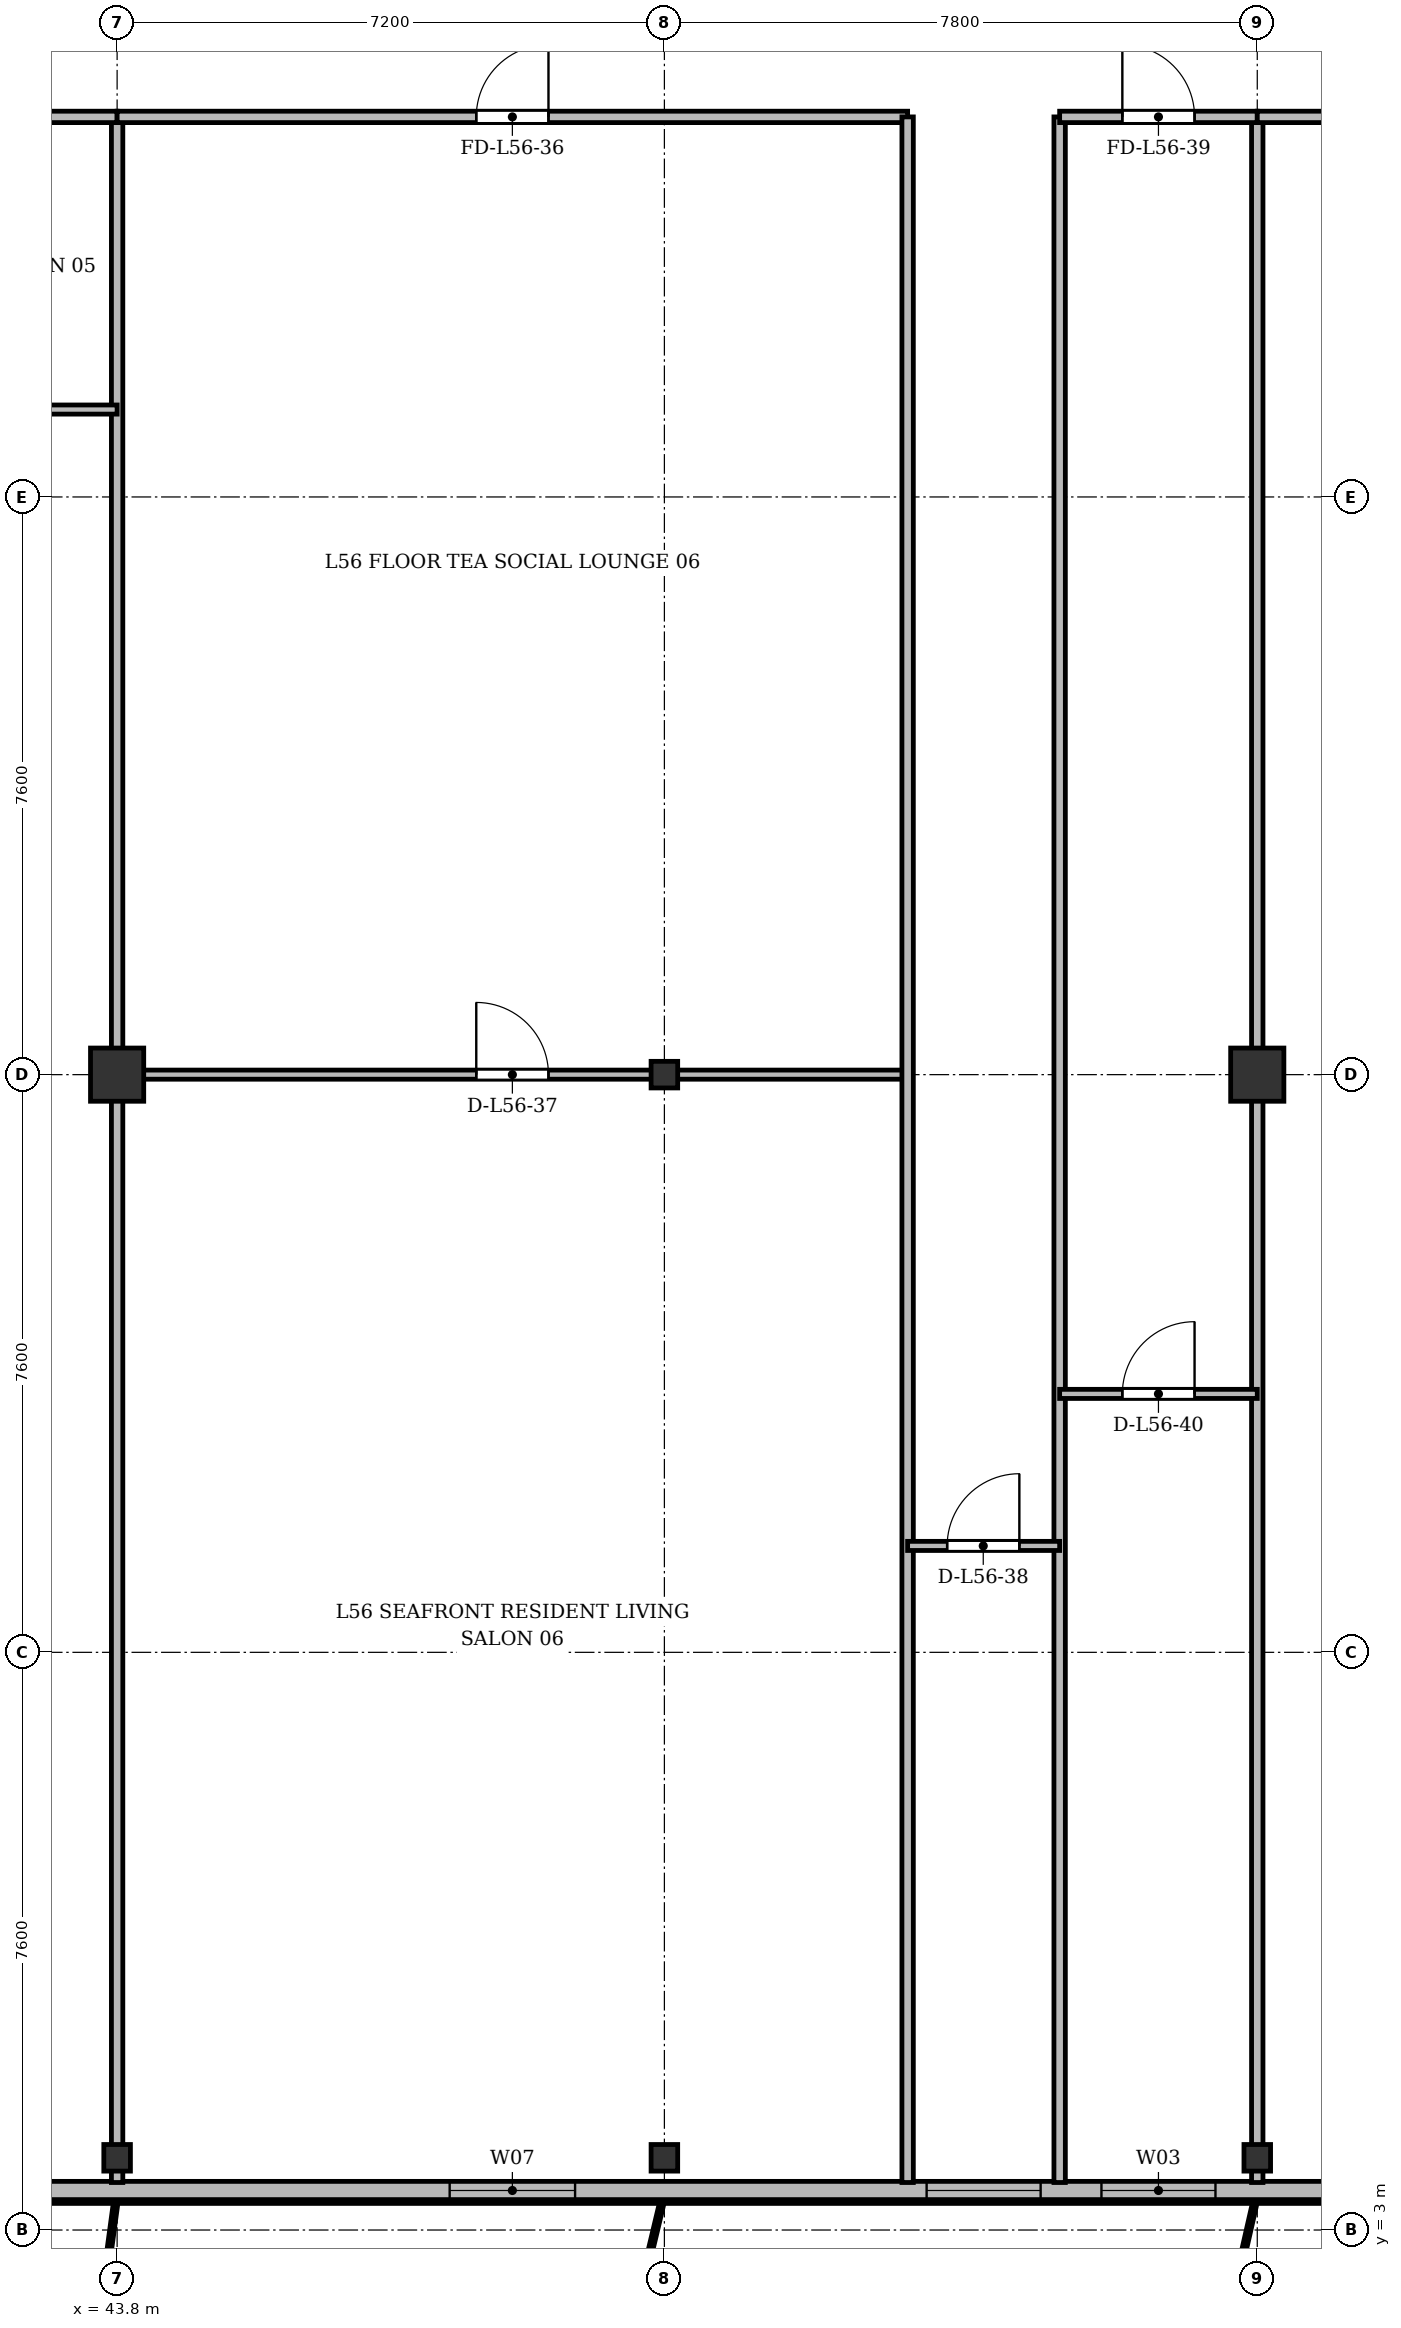
"""IFC4 building model, lengths in metres.
Left out: names, types, materials, properties, quantities, classifications, styles, units other than length and angle.
Written with IfcOpenShell. Run it as: python <this file> out.ifc"""

import sys

from ifc_helpers import new_model, si_unit, direction, frame, frame_2d, origin, origin_2d, place, context, subcontext, project, spatial, rectangle, i_section, extrude, source, transform, mapped, element, fill, save


model = new_model("IFC4")
c1 = context("Model", 3, precision=1e-05, world=origin(), true_north=direction((0.0, 1.0)))
c2 = subcontext(c1, "Body", "Model", "MODEL_VIEW")
j1 = project(units=[si_unit("LENGTHUNIT", "METRE"), si_unit("PLANEANGLEUNIT", "RADIAN")], contexts=[c1])
p1 = place(None, origin())
s1 = spatial("IfcSite", under=j1, at=p1, CompositionType="ELEMENT")
p2 = place(p1, origin())
s2 = spatial("IfcBuilding", under=s1, at=p2, CompositionType="ELEMENT")
p3 = place(p2, frame((0.0, 0.0, 215.7)))
s3 = spatial("IfcBuildingStorey", under=s2, at=p3, CompositionType="ELEMENT", Elevation=215.7)
m1 = source(origin(), c2, "Body", "SweptSolid", [
    extrude(i_section(OverallWidth=0.35, OverallDepth=0.35, WebThickness=0.018, FlangeThickness=0.028, at=origin_2d()), origin(), (0.0, 0.0, 1.0), 3.6),
])
p4 = place(p3, frame((43.8, 3.95, 0.0), z_axis=(0.0, 0.0, 1.0), x_axis=(1.0, 0.0, 0.0)))
e1 = element("IfcColumn", 1, at=p4, inside=s3, PredefinedType="COLUMN", context=c2, shape_type="MappedRepresentation", body=[
    mapped(m1, transform((0.0, 0.0, 0.0), x_axis=(1.0, 0.0, 0.0), y_axis=(0.0, 1.0, 0.0), z_axis=(0.0, 0.0, 1.0), scale=1.0)),
])
m2 = source(origin(), c2, "Body", "SweptSolid", [
    extrude(rectangle(XDim=0.7, YDim=0.7, at=origin_2d()), origin(), (0.0, 0.0, 1.0), 3.6),
])
p5 = place(p3, frame((43.8, 18.2, 0.0), z_axis=(0.0, 0.0, 1.0), x_axis=(1.0, 0.0, 0.0)))
e2 = element("IfcColumn", 2, at=p5, inside=s3, PredefinedType="COLUMN", context=c2, shape_type="MappedRepresentation", body=[
    mapped(m2, transform((0.0, 0.0, 0.0), x_axis=(1.0, 0.0, 0.0), y_axis=(0.0, 1.0, 0.0), z_axis=(0.0, 0.0, 1.0), scale=1.0)),
])
for number, where, z_axis, x_axis in (
    (3, (51.0, 3.95, 0.0), (0.0, 0.0, 1.0), (1.0, 0.0, 0.0)),
    (4, (51.0, 18.2, 0.0), (0.0, 0.0, 1.0), (1.0, 0.0, 0.0)),
    (5, (58.8, 3.95, 0.0), (0.0, 0.0, 1.0), (1.0, 0.0, 0.0)),
):
    element("IfcColumn", number, at=place(p3, frame(where, z_axis=z_axis, x_axis=x_axis)), inside=s3, PredefinedType="COLUMN", context=c2, shape_type="MappedRepresentation", body=[
        mapped(m1, transform((0.0, 0.0, 0.0), x_axis=(1.0, 0.0, 0.0), y_axis=(0.0, 1.0, 0.0), z_axis=(0.0, 0.0, 1.0), scale=1.0)),
    ])
p6 = place(p3, frame((58.8, 18.2, 0.0), z_axis=(0.0, 0.0, 1.0), x_axis=(1.0, 0.0, 0.0)))
e6 = element("IfcColumn", 6, at=p6, inside=s3, PredefinedType="COLUMN", context=c2, shape_type="MappedRepresentation", body=[
    mapped(m2, transform((0.0, 0.0, 0.0), x_axis=(1.0, 0.0, 0.0), y_axis=(0.0, 1.0, 0.0), z_axis=(0.0, 0.0, 1.0), scale=1.0)),
])
p7 = place(p3, frame((63.4, 3.52, 0.0), z_axis=(0.0, 0.0, 1.0), x_axis=(-1.0, 0.0, 0.0)))
e7 = element("IfcWall", 7, at=p7, inside=s3, PredefinedType="SOLIDWALL", context=c2, shape_type="SweptSolid", body=[
    extrude(rectangle(XDim=52.4, YDim=0.24, at=frame_2d((26.2, 0.0))), origin(), (0.0, 0.0, 1.0), 3.36),
])
p8 = place(p7, frame((1.245, 0.0, 0.9)))
e8 = element("IfcOpeningElement", 8, at=p8, cuts=e7, PredefinedType="OPENING", context=c2, shape_type="SweptSolid", body=[
    extrude(rectangle(XDim=2.2, YDim=1.8, at=frame_2d((1.1, 0.9))), frame((0.0, 0.13, 0.0), z_axis=(0.0, -1.0, 0.0), x_axis=(1.0, 0.0, 0.0)), (0.0, 0.0, 1.0), 0.26),
])
p9 = place(p7, frame((5.15, 0.0, 0.9)))
e9 = element("IfcOpeningElement", 9, at=p9, cuts=e7, PredefinedType="OPENING", context=c2, shape_type="SweptSolid", body=[
    extrude(rectangle(XDim=1.5, YDim=1.75, at=frame_2d((0.75, 0.875))), frame((0.0, 0.13, 0.0), z_axis=(0.0, -1.0, 0.0), x_axis=(1.0, 0.0, 0.0)), (0.0, 0.0, 1.0), 0.26),
])
p10 = place(p7, frame((7.45, 0.0, 0.9)))
e10 = element("IfcOpeningElement", 10, at=p10, cuts=e7, PredefinedType="OPENING", context=c2, shape_type="SweptSolid", body=[
    extrude(rectangle(XDim=1.5, YDim=1.75, at=frame_2d((0.75, 0.875))), frame((0.0, 0.13, 0.0), z_axis=(0.0, -1.0, 0.0), x_axis=(1.0, 0.0, 0.0)), (0.0, 0.0, 1.0), 0.26),
])
p11 = place(p7, frame((13.575, 0.0, 0.9)))
e11 = element("IfcOpeningElement", 11, at=p11, cuts=e7, PredefinedType="OPENING", context=c2, shape_type="SweptSolid", body=[
    extrude(rectangle(XDim=1.65, YDim=1.85, at=frame_2d((0.825, 0.925))), frame((0.0, 0.13, 0.0), z_axis=(0.0, -1.0, 0.0), x_axis=(1.0, 0.0, 0.0)), (0.0, 0.0, 1.0), 0.26),
])
p12 = place(p7, frame((25.3, 0.0, 0.9)))
e12 = element("IfcOpeningElement", 12, at=p12, cuts=e7, PredefinedType="OPENING", context=c2, shape_type="SweptSolid", body=[
    extrude(rectangle(XDim=1.8, YDim=1.8, at=frame_2d((0.9, 0.9))), frame((0.0, 0.13, 0.0), z_axis=(0.0, -1.0, 0.0), x_axis=(1.0, 0.0, 0.0)), (0.0, 0.0, 1.0), 0.26),
])
p13 = place(p7, frame((36.9, 0.0, 0.9)))
e13 = element("IfcOpeningElement", 13, at=p13, cuts=e7, PredefinedType="OPENING", context=c2, shape_type="SweptSolid", body=[
    extrude(rectangle(XDim=2.2, YDim=1.8, at=frame_2d((1.1, 0.9))), frame((0.0, 0.13, 0.0), z_axis=(0.0, -1.0, 0.0), x_axis=(1.0, 0.0, 0.0)), (0.0, 0.0, 1.0), 0.26),
])
p14 = place(p7, frame((43.45, 0.0, 0.9)))
e14 = element("IfcOpeningElement", 14, at=p14, cuts=e7, PredefinedType="OPENING", context=c2, shape_type="SweptSolid", body=[
    extrude(rectangle(XDim=1.5, YDim=1.75, at=frame_2d((0.75, 0.875))), frame((0.0, 0.13, 0.0), z_axis=(0.0, -1.0, 0.0), x_axis=(1.0, 0.0, 0.0)), (0.0, 0.0, 1.0), 0.26),
])
p15 = place(p7, frame((45.5, 0.0, 0.9)))
e15 = element("IfcOpeningElement", 15, at=p15, cuts=e7, PredefinedType="OPENING", context=c2, shape_type="SweptSolid", body=[
    extrude(rectangle(XDim=2.0, YDim=1.95, at=frame_2d((1.0, 0.975))), frame((0.0, 0.13, 0.0), z_axis=(0.0, -1.0, 0.0), x_axis=(1.0, 0.0, 0.0)), (0.0, 0.0, 1.0), 0.26),
])
p16 = place(p7, frame((49.23, 0.0, 0.9)))
e16 = element("IfcOpeningElement", 16, at=p16, cuts=e7, PredefinedType="OPENING", context=c2, shape_type="SweptSolid", body=[
    extrude(rectangle(XDim=1.65, YDim=1.85, at=frame_2d((0.825, 0.925))), frame((0.0, 0.13, 0.0), z_axis=(0.0, -1.0, 0.0), x_axis=(1.0, 0.0, 0.0)), (0.0, 0.0, 1.0), 0.26),
])
for number, where, z_axis, x_axis in (
    (17, (43.8, 3.625, 0.0), (0.0, 0.0, 1.0), (0.0, 1.0, 0.0)),
    (18, (58.8, 3.625, 0.0), (0.0, 0.0, 1.0), (0.0, 1.0, 0.0)),
):
    element("IfcWall", number, at=place(p3, frame(where, z_axis=z_axis, x_axis=x_axis)), inside=s3, PredefinedType="PARTITIONING", context=c2, shape_type="SweptSolid", body=[
        extrude(rectangle(XDim=27.175, YDim=0.15, at=frame_2d((13.587, 0.0))), origin(), (0.0, 0.0, 1.0), 2.86),
    ])
p17 = place(p3, frame((30.6, 30.8, 0.0), z_axis=(0.0, 0.0, 1.0), x_axis=(1.0, 0.0, 0.0)))
e19 = element("IfcWall", 19, at=p17, inside=s3, PredefinedType="PARTITIONING", context=c2, shape_type="SweptSolid", body=[
    extrude(rectangle(XDim=13.2, YDim=0.15, at=frame_2d((6.6, 0.0))), origin(), (0.0, 0.0, 1.0), 2.86),
])
p18 = place(p17, frame((6.034, 0.0, 0.0)))
e20 = element("IfcOpeningElement", 20, at=p18, cuts=e19, PredefinedType="OPENING", context=c2, shape_type="SweptSolid", body=[
    extrude(rectangle(XDim=0.95, YDim=2.15, at=frame_2d((0.475, 1.075))), frame((0.0, 0.085, 0.0), z_axis=(0.0, -1.0, 0.0), x_axis=(1.0, 0.0, 0.0)), (0.0, 0.0, 1.0), 0.17),
])
p19 = place(p3, frame((30.6, 26.95, 0.0), z_axis=(0.0, 0.0, 1.0), x_axis=(1.0, 0.0, 0.0)))
e21 = element("IfcWall", 21, at=p19, inside=s3, PredefinedType="PARTITIONING", context=c2, shape_type="SweptSolid", body=[
    extrude(rectangle(XDim=13.2, YDim=0.12, at=frame_2d((6.6, 0.0))), origin(), (0.0, 0.0, 1.0), 2.86),
])
p20 = place(p19, frame((6.034, 0.0, 0.0)))
e22 = element("IfcOpeningElement", 22, at=p20, cuts=e21, PredefinedType="OPENING", context=c2, shape_type="SweptSolid", body=[
    extrude(rectangle(XDim=0.95, YDim=2.15, at=frame_2d((0.475, 1.075))), frame((0.0, 0.07, 0.0), z_axis=(0.0, -1.0, 0.0), x_axis=(1.0, 0.0, 0.0)), (0.0, 0.0, 1.0), 0.14),
])
p21 = place(p3, frame((43.8, 30.8, 0.0), z_axis=(0.0, 0.0, 1.0), x_axis=(1.0, 0.0, 0.0)))
e23 = element("IfcWall", 23, at=p21, inside=s3, PredefinedType="PARTITIONING", context=c2, shape_type="SweptSolid", body=[
    extrude(rectangle(XDim=10.4, YDim=0.15, at=frame_2d((5.2, 0.0))), origin(), (0.0, 0.0, 1.0), 2.86),
])
p22 = place(p21, frame((4.725, 0.0, 0.0)))
e24 = element("IfcOpeningElement", 24, at=p22, cuts=e23, PredefinedType="OPENING", context=c2, shape_type="SweptSolid", body=[
    extrude(rectangle(XDim=0.95, YDim=2.15, at=frame_2d((0.475, 1.075))), frame((0.0, 0.085, 0.0), z_axis=(0.0, -1.0, 0.0), x_axis=(1.0, 0.0, 0.0)), (0.0, 0.0, 1.0), 0.17),
])
p23 = place(p3, frame((43.8, 18.2, 0.0), z_axis=(0.0, 0.0, 1.0), x_axis=(1.0, 0.0, 0.0)))
e25 = element("IfcWall", 25, at=p23, inside=s3, PredefinedType="PARTITIONING", context=c2, shape_type="SweptSolid", body=[
    extrude(rectangle(XDim=10.4, YDim=0.12, at=frame_2d((5.2, 0.0))), origin(), (0.0, 0.0, 1.0), 2.91),
])
p24 = place(p23, frame((4.725, 0.0, 0.0)))
e26 = element("IfcOpeningElement", 26, at=p24, cuts=e25, PredefinedType="OPENING", context=c2, shape_type="SweptSolid", body=[
    extrude(rectangle(XDim=0.95, YDim=2.15, at=frame_2d((0.475, 1.075))), frame((0.0, 0.07, 0.0), z_axis=(0.0, -1.0, 0.0), x_axis=(1.0, 0.0, 0.0)), (0.0, 0.0, 1.0), 0.14),
])
for number, where, z_axis, x_axis in (
    (27, (54.2, 3.625, 0.0), (0.0, 0.0, 1.0), (0.0, 1.0, 0.0)),
    (28, (56.2, 3.625, 0.0), (0.0, 0.0, 1.0), (0.0, 1.0, 0.0)),
):
    element("IfcWall", number, at=place(p3, frame(where, z_axis=z_axis, x_axis=x_axis)), inside=s3, PredefinedType="PARTITIONING", context=c2, shape_type="SweptSolid", body=[
        extrude(rectangle(XDim=27.175, YDim=0.15, at=frame_2d((13.587, 0.0))), origin(), (0.0, 0.0, 1.0), 2.91),
    ])
p25 = place(p3, frame((54.2, 12.0, 0.0), z_axis=(0.0, 0.0, 1.0), x_axis=(1.0, 0.0, 0.0)))
e29 = element("IfcWall", 29, at=p25, inside=s3, PredefinedType="PARTITIONING", context=c2, shape_type="SweptSolid", body=[
    extrude(rectangle(XDim=2.0, YDim=0.12, at=frame_2d((1.0, 0.0))), origin(), (0.0, 0.0, 1.0), 3.36),
])
p26 = place(p25, frame((0.52, 0.0, 0.0)))
e30 = element("IfcOpeningElement", 30, at=p26, cuts=e29, PredefinedType="OPENING", context=c2, shape_type="SweptSolid", body=[
    extrude(rectangle(XDim=0.95, YDim=2.15, at=frame_2d((0.475, 1.075))), frame((0.0, 0.07, 0.0), z_axis=(0.0, -1.0, 0.0), x_axis=(1.0, 0.0, 0.0)), (0.0, 0.0, 1.0), 0.14),
])
p27 = place(p3, frame((56.2, 30.8, 0.0), z_axis=(0.0, 0.0, 1.0), x_axis=(1.0, 0.0, 0.0)))
e31 = element("IfcWall", 31, at=p27, inside=s3, PredefinedType="PARTITIONING", context=c2, shape_type="SweptSolid", body=[
    extrude(rectangle(XDim=2.6, YDim=0.15, at=frame_2d((1.3, 0.0))), origin(), (0.0, 0.0, 1.0), 2.86),
])
p28 = place(p27, frame((0.825, 0.0, 0.0)))
e32 = element("IfcOpeningElement", 32, at=p28, cuts=e31, PredefinedType="OPENING", context=c2, shape_type="SweptSolid", body=[
    extrude(rectangle(XDim=0.95, YDim=2.15, at=frame_2d((0.475, 1.075))), frame((0.0, 0.085, 0.0), z_axis=(0.0, -1.0, 0.0), x_axis=(1.0, 0.0, 0.0)), (0.0, 0.0, 1.0), 0.17),
])
p29 = place(p3, frame((56.2, 14.0, 0.0), z_axis=(0.0, 0.0, 1.0), x_axis=(1.0, 0.0, 0.0)))
e33 = element("IfcWall", 33, at=p29, inside=s3, PredefinedType="PARTITIONING", context=c2, shape_type="SweptSolid", body=[
    extrude(rectangle(XDim=2.6, YDim=0.12, at=frame_2d((1.3, 0.0))), origin(), (0.0, 0.0, 1.0), 2.86),
])
p30 = place(p29, frame((0.825, 0.0, 0.0)))
e34 = element("IfcOpeningElement", 34, at=p30, cuts=e33, PredefinedType="OPENING", context=c2, shape_type="SweptSolid", body=[
    extrude(rectangle(XDim=0.95, YDim=2.15, at=frame_2d((0.475, 1.075))), frame((0.0, 0.07, 0.0), z_axis=(0.0, -1.0, 0.0), x_axis=(1.0, 0.0, 0.0)), (0.0, 0.0, 1.0), 0.14),
])
p31 = place(p3, frame((58.8, 30.8, 0.0), z_axis=(0.0, 0.0, 1.0), x_axis=(1.0, 0.0, 0.0)))
e35 = element("IfcWall", 35, at=p31, inside=s3, PredefinedType="PARTITIONING", context=c2, shape_type="SweptSolid", body=[
    extrude(rectangle(XDim=7.375, YDim=0.15, at=frame_2d((3.688, 0.0))), origin(), (0.0, 0.0, 1.0), 2.86),
])
p32 = place(p31, frame((2.795, 0.0, 0.0)))
e36 = element("IfcOpeningElement", 36, at=p32, cuts=e35, PredefinedType="OPENING", context=c2, shape_type="SweptSolid", body=[
    extrude(rectangle(XDim=1.6, YDim=2.2, at=frame_2d((0.8, 1.1))), frame((0.0, 0.085, 0.0), z_axis=(0.0, -1.0, 0.0), x_axis=(1.0, 0.0, 0.0)), (0.0, 0.0, 1.0), 0.17),
])
m3 = source(origin(), c2, "Body", "SweptSolid", [
    extrude(rectangle(XDim=1.5, YDim=1.75, at=frame_2d((0.75, 0.875))), frame((0.0, 0.03, 0.0), z_axis=(0.0, -1.0, 0.0), x_axis=(1.0, 0.0, 0.0)), (0.0, 0.0, 1.0), 0.06),
])
p33 = place(p9, origin())
e37 = element("IfcWindow", 37, at=p33, inside=s3, PartitioningType="SINGLE_PANEL", PredefinedType="WINDOW", context=c2, shape_type="MappedRepresentation", body=[
    mapped(m3, transform((0.0, 0.0, 0.0), x_axis=(1.0, 0.0, 0.0), y_axis=(0.0, 1.0, 0.0), z_axis=(0.0, 0.0, 1.0), scale=1.0)),
])
fill(e9, e37)
p34 = place(p10, origin())
e38 = element("IfcWindow", 38, at=p34, inside=s3, PartitioningType="SINGLE_PANEL", PredefinedType="WINDOW", context=c2, shape_type="MappedRepresentation", body=[
    mapped(m3, transform((0.0, 0.0, 0.0), x_axis=(1.0, 0.0, 0.0), y_axis=(0.0, 1.0, 0.0), z_axis=(0.0, 0.0, 1.0), scale=1.0)),
])
fill(e10, e38)
m4 = source(origin(), c2, "Body", "SweptSolid", [
    extrude(rectangle(XDim=1.65, YDim=1.85, at=frame_2d((0.825, 0.925))), frame((0.0, 0.03, 0.0), z_axis=(0.0, -1.0, 0.0), x_axis=(1.0, 0.0, 0.0)), (0.0, 0.0, 1.0), 0.06),
])
p35 = place(p11, origin())
e39 = element("IfcWindow", 39, at=p35, inside=s3, PartitioningType="SINGLE_PANEL", PredefinedType="WINDOW", context=c2, shape_type="MappedRepresentation", body=[
    mapped(m4, transform((0.0, 0.0, 0.0), x_axis=(1.0, 0.0, 0.0), y_axis=(0.0, 1.0, 0.0), z_axis=(0.0, 0.0, 1.0), scale=1.0)),
])
fill(e11, e39)
m5 = source(origin(), c2, "Body", "SweptSolid", [
    extrude(rectangle(XDim=0.95, YDim=2.15, at=frame_2d((0.475, 1.075))), frame((0.0, 0.025, 0.0), z_axis=(0.0, -1.0, 0.0), x_axis=(1.0, 0.0, 0.0)), (0.0, 0.0, 1.0), 0.05),
])
p36 = place(p22, origin())
e40 = element("IfcDoor", 40, at=p36, inside=s3, OperationType="SINGLE_SWING_RIGHT", PredefinedType="DOOR", context=c2, shape_type="MappedRepresentation", body=[
    mapped(m5, transform((0.0, 0.0, 0.0), x_axis=(1.0, 0.0, 0.0), y_axis=(0.0, 1.0, 0.0), z_axis=(0.0, 0.0, 1.0), scale=1.0)),
])
fill(e24, e40)
p37 = place(p24, origin())
e41 = element("IfcDoor", 41, at=p37, inside=s3, OperationType="SINGLE_SWING_LEFT", PredefinedType="DOOR", context=c2, shape_type="MappedRepresentation", body=[
    mapped(m5, transform((0.0, 0.0, 0.0), x_axis=(1.0, 0.0, 0.0), y_axis=(0.0, 1.0, 0.0), z_axis=(0.0, 0.0, 1.0), scale=1.0)),
])
fill(e26, e41)
p38 = place(p26, origin())
e42 = element("IfcDoor", 42, at=p38, inside=s3, OperationType="SINGLE_SWING_RIGHT", PredefinedType="DOOR", context=c2, shape_type="MappedRepresentation", body=[
    mapped(m5, transform((0.0, 0.0, 0.0), x_axis=(1.0, 0.0, 0.0), y_axis=(0.0, 1.0, 0.0), z_axis=(0.0, 0.0, 1.0), scale=1.0)),
])
fill(e30, e42)
p39 = place(p28, origin())
e43 = element("IfcDoor", 43, at=p39, inside=s3, OperationType="SINGLE_SWING_LEFT", PredefinedType="DOOR", context=c2, shape_type="MappedRepresentation", body=[
    mapped(m5, transform((0.0, 0.0, 0.0), x_axis=(1.0, 0.0, 0.0), y_axis=(0.0, 1.0, 0.0), z_axis=(0.0, 0.0, 1.0), scale=1.0)),
])
fill(e32, e43)
p40 = place(p30, origin())
e44 = element("IfcDoor", 44, at=p40, inside=s3, OperationType="SINGLE_SWING_RIGHT", PredefinedType="DOOR", context=c2, shape_type="MappedRepresentation", body=[
    mapped(m5, transform((0.0, 0.0, 0.0), x_axis=(1.0, 0.0, 0.0), y_axis=(0.0, 1.0, 0.0), z_axis=(0.0, 0.0, 1.0), scale=1.0)),
])
fill(e34, e44)
save(model, sys.argv[1])
